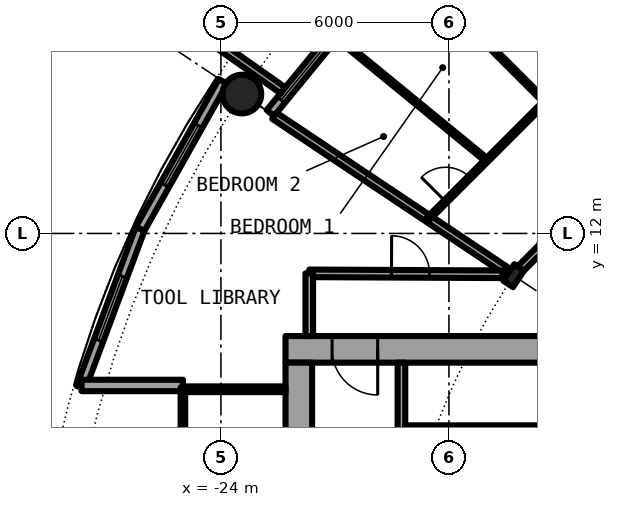
"""IFC4 building model, lengths in metres.
Left out: names, types, materials, properties, quantities, classifications, styles, units other than length and angle.
Written with IfcOpenShell. Run it as: python <this file> out.ifc"""

import sys

from ifc_helpers import new_model, si_unit, direction, frame, frame_2d, origin, origin_2d, place, context, subcontext, project, spatial, rectangle, hollow_circle, i_section, extrude, element, fill, save


model = new_model("IFC4")
c1 = context("Model", 3, precision=1e-05, world=origin(), true_north=direction((0.0, 1.0)))
c2 = subcontext(c1, "Body", "Model", "MODEL_VIEW")
j1 = project(units=[si_unit("LENGTHUNIT", "METRE"), si_unit("PLANEANGLEUNIT", "RADIAN")], contexts=[c1])
p1 = place(None, origin())
s1 = spatial("IfcSite", under=j1, at=p1, CompositionType="ELEMENT")
p2 = place(p1, origin())
s2 = spatial("IfcBuilding", under=s1, at=p2, CompositionType="ELEMENT")
p3 = place(p2, frame((0.0, 0.0, 69.7)))
s3 = spatial("IfcBuildingStorey", under=s2, at=p3, CompositionType="ELEMENT", Elevation=69.7)
p4 = place(p3, frame((-23.448, 15.667, 0.0), z_axis=(0.0, 0.0, 1.0), x_axis=(1.0, 0.0, 0.0)))
e1 = element("IfcColumn", 1, at=p4, inside=s3, PredefinedType="COLUMN", context=c2, shape_type="SweptSolid", body=[
    extrude(hollow_circle(Radius=0.508, WallThickness=0.04, at=origin_2d()), origin(), (0.0, 0.0, 1.0), 3.05),
])
p5 = place(p3, frame((-16.297, 10.889, 0.0), z_axis=(0.0, 0.0, 1.0), x_axis=(-0.831469612303, 0.55557023302, 0.0)))
e2 = element("IfcColumn", 2, at=p5, inside=s3, PredefinedType="COLUMN", context=c2, shape_type="SweptSolid", body=[
    extrude(i_section(OverallWidth=0.306, OverallDepth=0.524, WebThickness=0.021, FlangeThickness=0.04, FilletRadius=0.027, at=origin_2d()), origin(), (0.0, 0.0, 1.0), 3.05),
])
p6 = place(p3, frame((-19.304, 19.304, 0.0), z_axis=(0.0, 0.0, 1.0), x_axis=(-0.634382322723, -0.773019449054, 0.0)))
e3 = element("IfcWall", 3, at=p6, inside=s3, PredefinedType="SOLIDWALL", context=c2, shape_type="SweptSolid", body=[
    extrude(rectangle(XDim=5.352, YDim=0.25, at=frame_2d((2.676, 0.0))), origin(), (0.0, 0.0, 1.0), 2.7),
])
p7 = place(p6, frame((0.841, 0.0, 0.0)))
e4 = element("IfcOpeningElement", 4, at=p7, cuts=e3, PredefinedType="OPENING", context=c2, shape_type="SweptSolid", body=[
    extrude(rectangle(XDim=1.0, YDim=2.2, at=frame_2d((0.5, 1.1))), frame((0.0, 0.135, 0.0), z_axis=(0.0, -1.0, 0.0), x_axis=(1.0, 0.0, 0.0)), (0.0, 0.0, 1.0), 0.27),
])
p8 = place(p6, frame((3.111, 0.0, 0.3)))
e5 = element("IfcOpeningElement", 5, at=p8, cuts=e3, PredefinedType="OPENING", context=c2, shape_type="SweptSolid", body=[
    extrude(rectangle(XDim=1.8, YDim=2.1, at=frame_2d((0.9, 1.05))), frame((0.0, 0.135, 0.0), z_axis=(0.0, -1.0, 0.0), x_axis=(1.0, 0.0, 0.0)), (0.0, 0.0, 1.0), 0.27),
])
p9 = place(p3, frame((-22.37, 15.765, -0.03), z_axis=(0.0, 0.0, 1.0), x_axis=(-0.817256123454, 0.576274612209, 0.0)))
e6 = element("IfcWall", 6, at=p9, inside=s3, PredefinedType="SOLIDWALL", context=c2, shape_type="SweptSolid", body=[
    extrude(rectangle(XDim=2.933, YDim=0.2, at=frame_2d((1.466, 0.0))), origin(), (0.0, 0.0, 1.0), 2.73),
])
p10 = place(p3, frame((-23.946, 16.0, 0.0), z_axis=(0.0, 0.0, 1.0), x_axis=(-0.489696356642, -0.871893042919, 0.0)))
e7 = element("IfcWall", 7, at=p10, inside=s3, PredefinedType="SOLIDWALL", context=c2, shape_type="SweptSolid", body=[
    extrude(rectangle(XDim=4.454, YDim=0.25, at=frame_2d((2.227, 0.0))), origin(), (0.0, 0.0, 1.0), 2.7),
])
p11 = place(p10, frame((1.327, 0.0, 0.3)))
e8 = element("IfcOpeningElement", 8, at=p11, cuts=e7, PredefinedType="OPENING", context=c2, shape_type="SweptSolid", body=[
    extrude(rectangle(XDim=1.8, YDim=2.1, at=frame_2d((0.9, 1.05))), frame((0.0, 0.135, 0.0), z_axis=(0.0, -1.0, 0.0), x_axis=(1.0, 0.0, 0.0)), (0.0, 0.0, 1.0), 0.27),
])
p12 = place(p3, frame((-26.127, 12.117, 0.0), z_axis=(0.0, 0.0, 1.0), x_axis=(-0.349247811493, -0.937030397675, 0.0)))
e9 = element("IfcWall", 9, at=p12, inside=s3, PredefinedType="SOLIDWALL", context=c2, shape_type="SweptSolid", body=[
    extrude(rectangle(XDim=4.452, YDim=0.25, at=frame_2d((2.226, 0.0))), origin(), (0.0, 0.0, 1.0), 2.7),
])
p13 = place(p12, frame((1.327, 0.0, 0.3)))
e10 = element("IfcOpeningElement", 10, at=p13, cuts=e9, PredefinedType="OPENING", context=c2, shape_type="SweptSolid", body=[
    extrude(rectangle(XDim=1.8, YDim=2.1, at=frame_2d((0.9, 1.05))), frame((0.0, 0.135, 0.0), z_axis=(0.0, -1.0, 0.0), x_axis=(1.0, 0.0, 0.0)), (0.0, 0.0, 1.0), 0.27),
])
p14 = place(p3, frame((-25.0, 8.0, 0.0), z_axis=(0.0, 0.0, 1.0), x_axis=(-1.0, 0.0, 0.0)))
e11 = element("IfcWall", 11, at=p14, inside=s3, PredefinedType="SOLIDWALL", context=c2, shape_type="SweptSolid", body=[
    extrude(rectangle(XDim=2.667, YDim=0.3, at=frame_2d((1.333, 0.0))), origin(), (0.0, 0.0, 1.0), 2.7),
])
p15 = place(p3, frame((-8.3, 8.95, 0.0), z_axis=(0.0, 0.0, 1.0), x_axis=(-1.0, 0.0, 0.0)))
e12 = element("IfcWall", 12, at=p15, inside=s3, PredefinedType="SHEAR", context=c2, shape_type="SweptSolid", body=[
    extrude(rectangle(XDim=14.0, YDim=0.7, at=frame_2d((7.0, 0.0))), origin(), (0.0, 0.0, 1.0), 3.05),
])
p16 = place(p15, frame((11.575, 0.0, 0.0)))
e13 = element("IfcOpeningElement", 13, at=p16, cuts=e12, PredefinedType="OPENING", context=c2, shape_type="SweptSolid", body=[
    extrude(rectangle(XDim=1.2, YDim=2.3, at=frame_2d((0.6, 1.15))), frame((0.0, 0.36, 0.0), z_axis=(0.0, -1.0, 0.0), x_axis=(1.0, 0.0, 0.0)), (0.0, 0.0, 1.0), 0.72),
])
p17 = place(p3, frame((-21.95, -8.6, 0.0), z_axis=(0.0, 0.0, 1.0), x_axis=(0.0, 1.0, 0.0)))
e14 = element("IfcWall", 14, at=p17, inside=s3, PredefinedType="SHEAR", context=c2, shape_type="SweptSolid", body=[
    extrude(rectangle(XDim=17.2, YDim=0.7, at=frame_2d((8.6, 0.0))), origin(), (0.0, 0.0, 1.0), 3.05),
])
p18 = place(p17, frame((7.7, 0.0, 0.0)))
e15 = element("IfcOpeningElement", 15, at=p18, cuts=e14, PredefinedType="OPENING", context=c2, shape_type="SweptSolid", body=[
    extrude(rectangle(XDim=1.8, YDim=2.3, at=frame_2d((0.9, 1.15))), frame((0.0, 0.36, 0.0), z_axis=(0.0, -1.0, 0.0), x_axis=(1.0, 0.0, 0.0)), (0.0, 0.0, 1.0), 0.72),
])
p19 = place(p3, frame((-19.25, 8.6, 0.0), z_axis=(0.0, 0.0, 1.0), x_axis=(0.0, -1.0, 0.0)))
e16 = element("IfcWall", 16, at=p19, inside=s3, PredefinedType="SOLIDWALL", context=c2, shape_type="SweptSolid", body=[
    extrude(rectangle(XDim=7.025, YDim=0.2, at=frame_2d((3.513, 0.0))), origin(), (0.0, 0.0, 1.0), 2.7),
])
p20 = place(p19, frame((2.35, 0.0, 0.0)))
e17 = element("IfcOpeningElement", 17, at=p20, cuts=e16, PredefinedType="OPENING", context=c2, shape_type="SweptSolid", body=[
    extrude(rectangle(XDim=1.1, YDim=2.3, at=frame_2d((0.55, 1.15))), frame((0.0, 0.11, 0.0), z_axis=(0.0, -1.0, 0.0), x_axis=(1.0, 0.0, 0.0)), (0.0, 0.0, 1.0), 0.22),
])
p21 = place(p3, frame((-15.45, 6.875, 0.0), z_axis=(0.0, 0.0, 1.0), x_axis=(-1.0, 0.0, 0.0)))
e18 = element("IfcWall", 18, at=p21, inside=s3, PredefinedType="PARTITIONING", context=c2, shape_type="SweptSolid", body=[
    extrude(rectangle(XDim=3.7, YDim=0.15, at=frame_2d((1.85, 0.0))), origin(), (0.0, 0.0, 1.0), 2.7),
])
p22 = place(p21, frame((1.4, 0.0, 0.0)))
e19 = element("IfcOpeningElement", 19, at=p22, cuts=e18, PredefinedType="OPENING", context=c2, shape_type="SweptSolid", body=[
    extrude(rectangle(XDim=0.9, YDim=2.3, at=frame_2d((0.45, 1.15))), frame((0.0, 0.085, 0.0), z_axis=(0.0, -1.0, 0.0), x_axis=(1.0, 0.0, 0.0)), (0.0, 0.0, 1.0), 0.17),
])
p23 = place(p3, frame((-22.3, 7.9, 0.0), z_axis=(0.0, 0.0, 1.0), x_axis=(-1.0, 0.0, 0.0)))
e20 = element("IfcWall", 20, at=p23, inside=s3, PredefinedType="PARTITIONING", context=c2, shape_type="SweptSolid", body=[
    extrude(rectangle(XDim=2.64, YDim=0.15, at=frame_2d((1.32, 0.0))), origin(), (0.0, 0.0, 1.0), 2.7),
])
p24 = place(p3, frame((-25.0, 7.95, 0.0), z_axis=(0.0, 0.0, 1.0), x_axis=(0.0, -1.0, 0.0)))
e21 = element("IfcWall", 21, at=p24, inside=s3, PredefinedType="PARTITIONING", context=c2, shape_type="SweptSolid", body=[
    extrude(rectangle(XDim=15.9, YDim=0.12, at=frame_2d((7.95, 0.0))), origin(), (0.0, 0.0, 1.0), 2.7),
])
p25 = place(p24, frame((0.95, 0.0, 0.1)))
e22 = element("IfcOpeningElement", 22, at=p25, cuts=e21, PredefinedType="OPENING", context=c2, shape_type="SweptSolid", body=[
    extrude(rectangle(XDim=14.0, YDim=2.35, at=frame_2d((7.0, 1.175))), frame((0.0, 0.07, 0.0), z_axis=(0.0, -1.0, 0.0), x_axis=(1.0, 0.0, 0.0)), (0.0, 0.0, 1.0), 0.14),
])
p26 = place(p3, frame((-22.595, 15.098, 0.0), z_axis=(0.0, 0.0, 1.0), x_axis=(0.831382022135, -0.555701298605, 0.0)))
e23 = element("IfcWall", 23, at=p26, inside=s3, PredefinedType="PARTITIONING", context=c2, shape_type="SweptSolid", body=[
    extrude(rectangle(XDim=7.313, YDim=0.2, at=frame_2d((3.657, 0.0))), origin(), (0.0, 0.0, 1.0), 2.7),
])
p27 = place(p3, frame((-21.023, 17.22, 0.0), z_axis=(0.0, 0.0, 1.0), x_axis=(0.773517471898, -0.633774976367, 0.0)))
e24 = element("IfcWall", 24, at=p27, inside=s3, PredefinedType="PARTITIONING", context=c2, shape_type="SweptSolid", body=[
    extrude(rectangle(XDim=5.196, YDim=0.1, at=frame_2d((2.598, 0.0))), origin(), (0.0, 0.0, 1.0), 2.7),
])
p28 = place(p3, frame((-19.216, 19.216, 0.0), z_axis=(0.0, 0.0, 1.0), x_axis=(0.707106781187, -0.707106781187, 0.0)))
e25 = element("IfcWall", 25, at=p28, inside=s3, PredefinedType="PARTITIONING", context=c2, shape_type="SweptSolid", body=[
    extrude(rectangle(XDim=5.305, YDim=0.1, at=frame_2d((2.652, 0.0))), origin(), (0.0, 0.0, 1.0), 2.7),
])
p29 = place(p28, frame((2.202, 0.0, 0.0)))
e26 = element("IfcOpeningElement", 26, at=p29, cuts=e25, PredefinedType="OPENING", context=c2, shape_type="SweptSolid", body=[
    extrude(rectangle(XDim=0.9, YDim=2.3, at=frame_2d((0.45, 1.15))), frame((0.0, 0.06, 0.0), z_axis=(0.0, -1.0, 0.0), x_axis=(1.0, 0.0, 0.0)), (0.0, 0.0, 1.0), 0.12),
])
p30 = place(p3, frame((-21.675, 10.95, 0.0), z_axis=(0.0, 0.0, 1.0), x_axis=(0.999988019025, -0.004895079807, 0.0)))
e27 = element("IfcWall", 27, at=p30, inside=s3, PredefinedType="PARTITIONING", context=c2, shape_type="SweptSolid", body=[
    extrude(rectangle(XDim=5.087, YDim=0.2, at=frame_2d((2.543, 0.0))), origin(), (0.0, 0.0, 1.0), 2.7),
])
p31 = place(p30, frame((2.163, 0.0, 0.0)))
e28 = element("IfcOpeningElement", 28, at=p31, cuts=e27, PredefinedType="OPENING", context=c2, shape_type="SweptSolid", body=[
    extrude(rectangle(XDim=1.0, YDim=2.3, at=frame_2d((0.5, 1.15))), frame((0.0, 0.11, 0.0), z_axis=(0.0, -1.0, 0.0), x_axis=(1.0, 0.0, 0.0)), (0.0, 0.0, 1.0), 0.22),
])
p32 = place(p3, frame((-16.186, 11.0, 0.0), z_axis=(0.0, 0.0, 1.0), x_axis=(0.707106781187, 0.707106781187, 0.0)))
e29 = element("IfcWall", 29, at=p32, inside=s3, PredefinedType="PARTITIONING", context=c2, shape_type="SweptSolid", body=[
    extrude(rectangle(XDim=7.334, YDim=0.2, at=frame_2d((3.667, 0.0))), origin(), (0.0, 0.0, 1.0), 2.38),
])
p33 = place(p32, frame((2.211, 0.0, 0.0)))
e30 = element("IfcOpeningElement", 30, at=p33, cuts=e29, PredefinedType="OPENING", context=c2, shape_type="SweptSolid", body=[
    extrude(rectangle(XDim=1.0, YDim=2.3, at=frame_2d((0.5, 1.15))), frame((0.0, 0.11, 0.0), z_axis=(0.0, -1.0, 0.0), x_axis=(1.0, 0.0, 0.0)), (0.0, 0.0, 1.0), 0.22),
])
p34 = place(p3, frame((-21.675, 9.3, 0.0), z_axis=(0.0, 0.0, 1.0), x_axis=(0.0, 1.0, 0.0)))
e31 = element("IfcWall", 31, at=p34, inside=s3, PredefinedType="PARTITIONING", context=c2, shape_type="SweptSolid", body=[
    extrude(rectangle(XDim=1.65, YDim=0.2, at=frame_2d((0.825, 0.0))), origin(), (0.0, 0.0, 1.0), 2.7),
])
p35 = place(p3, frame((-18.542, 12.389, 0.0), z_axis=(0.0, 0.0, 1.0), x_axis=(0.707190945535, 0.707022606819, 0.0)))
e32 = element("IfcWall", 32, at=p35, inside=s3, PredefinedType="PARTITIONING", context=c2, shape_type="SweptSolid", body=[
    extrude(rectangle(XDim=4.351, YDim=0.1, at=frame_2d((2.175, 0.0))), origin(), (0.0, 0.0, 1.0), 2.7),
])
p36 = place(p35, frame((0.639, 0.0, 0.0)))
e33 = element("IfcOpeningElement", 33, at=p36, cuts=e32, PredefinedType="OPENING", context=c2, shape_type="SweptSolid", body=[
    extrude(rectangle(XDim=0.9, YDim=2.3, at=frame_2d((0.45, 1.15))), frame((0.0, 0.06, 0.0), z_axis=(0.0, -1.0, 0.0), x_axis=(1.0, 0.0, 0.0)), (0.0, 0.0, 1.0), 0.12),
])
p37 = place(p8, origin())
e34 = element("IfcWindow", 34, at=p37, inside=s3, PartitioningType="SINGLE_PANEL", PredefinedType="WINDOW", context=c2, shape_type="SweptSolid", body=[
    extrude(rectangle(XDim=1.8, YDim=2.1, at=frame_2d((0.9, 1.05))), frame((0.0, 0.03, 0.0), z_axis=(0.0, -1.0, 0.0), x_axis=(1.0, 0.0, 0.0)), (0.0, 0.0, 1.0), 0.06),
])
fill(e5, e34)
p38 = place(p11, origin())
e35 = element("IfcWindow", 35, at=p38, inside=s3, PartitioningType="SINGLE_PANEL", PredefinedType="WINDOW", context=c2, shape_type="SweptSolid", body=[
    extrude(rectangle(XDim=1.8, YDim=2.1, at=frame_2d((0.9, 1.05))), frame((0.0, 0.03, 0.0), z_axis=(0.0, -1.0, 0.0), x_axis=(1.0, 0.0, 0.0)), (0.0, 0.0, 1.0), 0.06),
])
fill(e8, e35)
p39 = place(p13, origin())
e36 = element("IfcWindow", 36, at=p39, inside=s3, PartitioningType="SINGLE_PANEL", PredefinedType="WINDOW", context=c2, shape_type="SweptSolid", body=[
    extrude(rectangle(XDim=1.8, YDim=2.1, at=frame_2d((0.9, 1.05))), frame((0.0, 0.03, 0.0), z_axis=(0.0, -1.0, 0.0), x_axis=(1.0, 0.0, 0.0)), (0.0, 0.0, 1.0), 0.06),
])
fill(e10, e36)
p40 = place(p22, origin())
e37 = element("IfcDoor", 37, at=p40, inside=s3, OperationType="SINGLE_SWING_LEFT", PredefinedType="DOOR", context=c2, shape_type="SweptSolid", body=[
    extrude(rectangle(XDim=0.9, YDim=2.3, at=frame_2d((0.45, 1.15))), frame((0.0, 0.025, 0.0), z_axis=(0.0, -1.0, 0.0), x_axis=(1.0, 0.0, 0.0)), (0.0, 0.0, 1.0), 0.05),
])
fill(e19, e37)
p41 = place(p16, origin())
e38 = element("IfcDoor", 38, at=p41, inside=s3, OperationType="SINGLE_SWING_LEFT", PredefinedType="DOOR", context=c2, shape_type="SweptSolid", body=[
    extrude(rectangle(XDim=1.2, YDim=2.3, at=frame_2d((0.6, 1.15))), frame((0.0, 0.025, 0.0), z_axis=(0.0, -1.0, 0.0), x_axis=(1.0, 0.0, 0.0)), (0.0, 0.0, 1.0), 0.05),
])
fill(e13, e38)
p42 = place(p25, origin())
e39 = element("IfcWindow", 39, at=p42, inside=s3, PartitioningType="SINGLE_PANEL", PredefinedType="WINDOW", context=c2, shape_type="SweptSolid", body=[
    extrude(rectangle(XDim=14.0, YDim=2.35, at=frame_2d((7.0, 1.175))), frame((0.0, 0.03, 0.0), z_axis=(0.0, -1.0, 0.0), x_axis=(1.0, 0.0, 0.0)), (0.0, 0.0, 1.0), 0.06),
])
fill(e22, e39)
p43 = place(p36, origin())
e40 = element("IfcDoor", 40, at=p43, inside=s3, OperationType="SINGLE_SWING_LEFT", PredefinedType="DOOR", context=c2, shape_type="SweptSolid", body=[
    extrude(rectangle(XDim=0.9, YDim=2.3, at=frame_2d((0.45, 1.15))), frame((0.0, 0.025, 0.0), z_axis=(0.0, -1.0, 0.0), x_axis=(1.0, 0.0, 0.0)), (0.0, 0.0, 1.0), 0.05),
])
fill(e33, e40)
p44 = place(p31, origin())
e41 = element("IfcDoor", 41, at=p44, inside=s3, OperationType="SINGLE_SWING_RIGHT", PredefinedType="DOOR", context=c2, shape_type="SweptSolid", body=[
    extrude(rectangle(XDim=1.0, YDim=2.3, at=frame_2d((0.5, 1.15))), frame((0.0, 0.025, 0.0), z_axis=(0.0, -1.0, 0.0), x_axis=(1.0, 0.0, 0.0)), (0.0, 0.0, 1.0), 0.05),
])
fill(e28, e41)
save(model, sys.argv[1])
